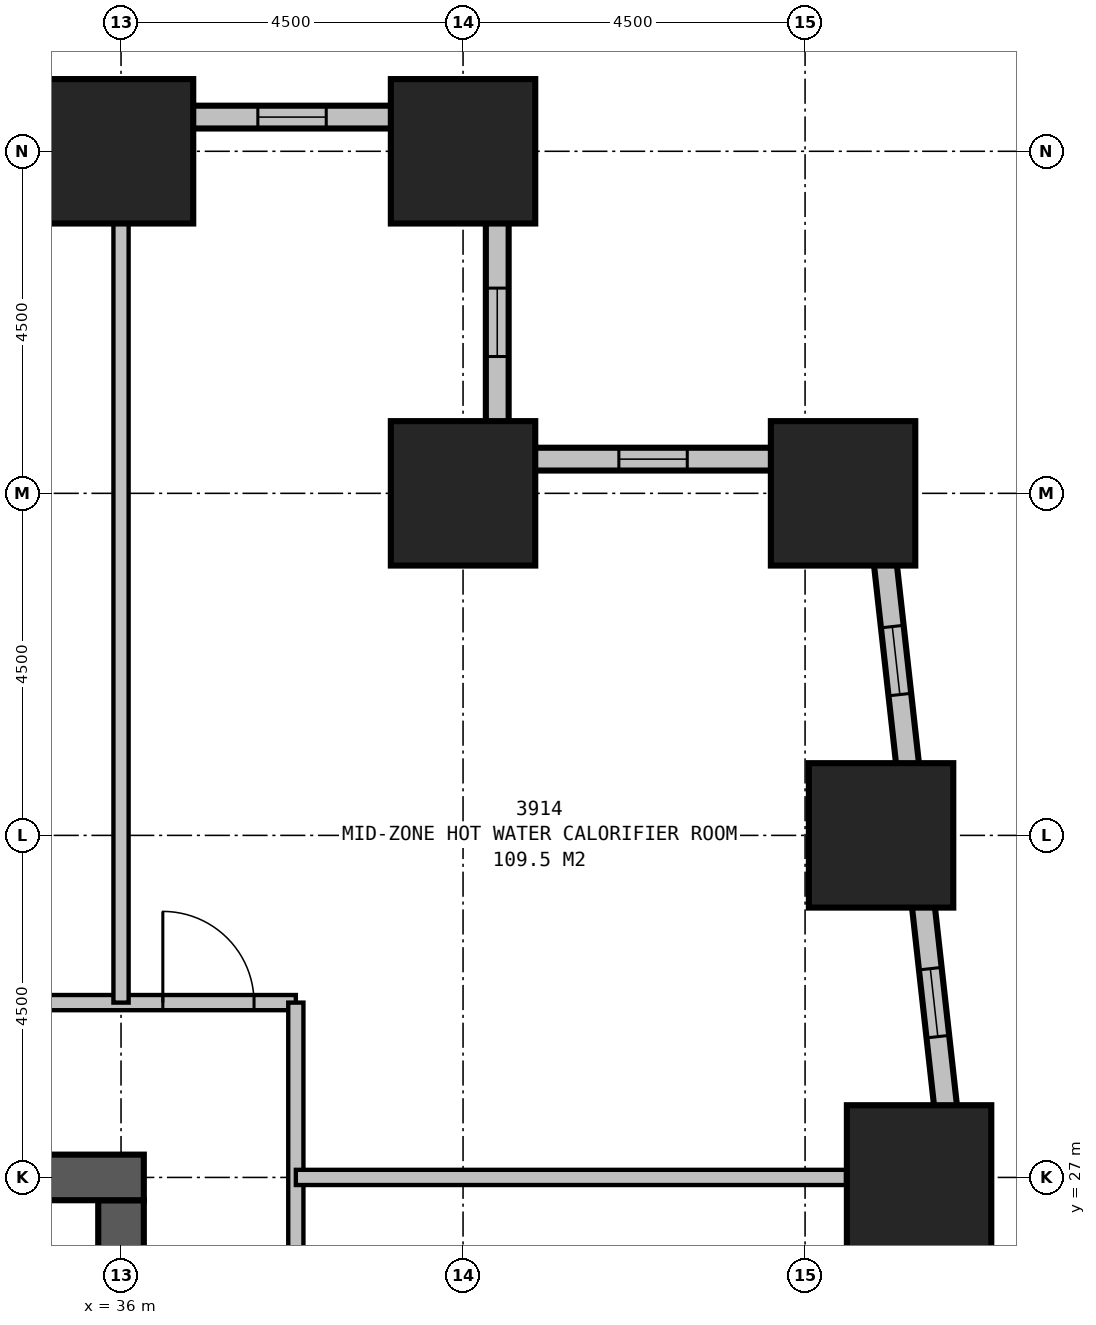
"""IFC4 building model, lengths in metres.
Left out: names, types, materials, properties, quantities, classifications, styles, units other than length and angle.
Written with IfcOpenShell. Run it as: python <this file> out.ifc"""

import sys

from ifc_helpers import new_model, si_unit, direction, frame, frame_2d, origin, origin_2d, place, context, subcontext, project, spatial, rectangle, extrude, element, fill, save


model = new_model("IFC4")
c1 = context("Model", 3, precision=1e-05, world=origin(), true_north=direction((0.0, 1.0)))
c2 = subcontext(c1, "Body", "Model", "MODEL_VIEW")
j1 = project(units=[si_unit("LENGTHUNIT", "METRE"), si_unit("PLANEANGLEUNIT", "RADIAN")], contexts=[c1])
p1 = place(None, origin())
s1 = spatial("IfcSite", under=j1, at=p1, CompositionType="ELEMENT")
p2 = place(p1, origin())
s2 = spatial("IfcBuilding", under=s1, at=p2, CompositionType="ELEMENT")
p3 = place(p2, frame((0.0, 0.0, 151.9)))
s3 = spatial("IfcBuildingStorey", under=s2, at=p3, CompositionType="ELEMENT", Elevation=151.9)
for number, where, z_axis, x_axis in (
    (1, (46.5, 27.0, 0.0), (0.0, 0.0, 1.0), (1.0, 0.0, 0.0)),
    (2, (46.0, 31.5, 0.0), (0.0, 0.0, 1.0), (1.0, 0.0, 0.0)),
    (3, (45.5, 36.0, 0.0), (0.0, 0.0, 1.0), (1.0, 0.0, 0.0)),
    (4, (40.5, 36.0, 0.0), (0.0, 0.0, 1.0), (1.0, 0.0, 0.0)),
    (5, (40.5, 40.5, 0.0), (0.0, 0.0, 1.0), (1.0, 0.0, 0.0)),
    (6, (36.0, 40.5, 0.0), (0.0, 0.0, 1.0), (1.0, 0.0, 0.0)),
):
    element("IfcColumn", number, at=place(p3, frame(where, z_axis=z_axis, x_axis=x_axis)), inside=s3, PredefinedType="COLUMN", context=c2, shape_type="SweptSolid", body=[
        extrude(rectangle(XDim=1.9, YDim=1.9, at=origin_2d()), origin(), (0.0, 0.0, 1.0), 6.0),
    ])
p4 = place(p3, frame((36.3, 27.0, 0.0), z_axis=(0.0, 0.0, 1.0), x_axis=(-1.0, 0.0, 0.0)))
e7 = element("IfcWall", 7, at=p4, inside=s3, PredefinedType="SHEAR", context=c2, shape_type="SweptSolid", body=[
    extrude(rectangle(XDim=23.1, YDim=0.6, at=frame_2d((11.55, 0.0))), origin(), (0.0, 0.0, 1.0), 6.0),
])
p5 = place(p4, frame((17.05, 0.0, 0.0)))
e8 = element("IfcOpeningElement", 8, at=p5, cuts=e7, PredefinedType="OPENING", context=c2, shape_type="SweptSolid", body=[
    extrude(rectangle(XDim=1.0, YDim=2.1, at=frame_2d((0.5, 1.05))), frame((0.0, 0.31, 0.0), z_axis=(0.0, -1.0, 0.0), x_axis=(1.0, 0.0, 0.0)), (0.0, 0.0, 1.0), 0.62),
])
p6 = place(p4, frame((12.05, 0.0, 0.0)))
e9 = element("IfcOpeningElement", 9, at=p6, cuts=e7, PredefinedType="OPENING", context=c2, shape_type="SweptSolid", body=[
    extrude(rectangle(XDim=1.0, YDim=2.1, at=frame_2d((0.5, 1.05))), frame((0.0, 0.31, 0.0), z_axis=(0.0, -1.0, 0.0), x_axis=(1.0, 0.0, 0.0)), (0.0, 0.0, 1.0), 0.62),
])
p7 = place(p4, frame((7.05, 0.0, 0.0)))
e10 = element("IfcOpeningElement", 10, at=p7, cuts=e7, PredefinedType="OPENING", context=c2, shape_type="SweptSolid", body=[
    extrude(rectangle(XDim=1.0, YDim=2.1, at=frame_2d((0.5, 1.05))), frame((0.0, 0.31, 0.0), z_axis=(0.0, -1.0, 0.0), x_axis=(1.0, 0.0, 0.0)), (0.0, 0.0, 1.0), 0.62),
])
p8 = place(p3, frame((36.0, 20.0, 0.0), z_axis=(0.0, 0.0, 1.0), x_axis=(0.0, 1.0, 0.0)))
e11 = element("IfcWall", 11, at=p8, inside=s3, PredefinedType="SHEAR", context=c2, shape_type="SweptSolid", body=[
    extrude(rectangle(XDim=6.7, YDim=0.6, at=frame_2d((3.35, 0.0))), origin(), (0.0, 0.0, 1.0), 6.0),
])
p9 = place(p3, frame((49.519, 3.901, 0.0), z_axis=(0.0, 0.0, 1.0), x_axis=(-0.110429082637, 0.993884006164, 0.0)))
e12 = element("IfcWall", 12, at=p9, inside=s3, PredefinedType="STANDARD", context=c2, shape_type="SweptSolid", body=[
    extrude(rectangle(XDim=32.899, YDim=0.3, at=frame_2d((16.45, 0.0))), origin(), (0.0, 0.0, 1.0), 3.35),
])
p10 = place(p9, frame((2.467, 0.0, 0.5)))
e13 = element("IfcOpeningElement", 13, at=p10, cuts=e12, PredefinedType="OPENING", context=c2, shape_type="SweptSolid", body=[
    extrude(rectangle(XDim=0.9, YDim=1.2, at=frame_2d((0.45, 0.6))), frame((0.0, 0.16, 0.0), z_axis=(0.0, -1.0, 0.0), x_axis=(1.0, 0.0, 0.0)), (0.0, 0.0, 1.0), 0.32),
])
p11 = place(p9, frame((6.995, 0.0, 0.5)))
e14 = element("IfcOpeningElement", 14, at=p11, cuts=e12, PredefinedType="OPENING", context=c2, shape_type="SweptSolid", body=[
    extrude(rectangle(XDim=0.9, YDim=1.2, at=frame_2d((0.45, 0.6))), frame((0.0, 0.16, 0.0), z_axis=(0.0, -1.0, 0.0), x_axis=(1.0, 0.0, 0.0)), (0.0, 0.0, 1.0), 0.32),
])
p12 = place(p9, frame((11.522, 0.0, 0.5)))
e15 = element("IfcOpeningElement", 15, at=p12, cuts=e12, PredefinedType="OPENING", context=c2, shape_type="SweptSolid", body=[
    extrude(rectangle(XDim=0.9, YDim=1.2, at=frame_2d((0.45, 0.6))), frame((0.0, 0.16, 0.0), z_axis=(0.0, -1.0, 0.0), x_axis=(1.0, 0.0, 0.0)), (0.0, 0.0, 1.0), 0.32),
])
p13 = place(p9, frame((16.05, 0.0, 0.5)))
e16 = element("IfcOpeningElement", 16, at=p13, cuts=e12, PredefinedType="OPENING", context=c2, shape_type="SweptSolid", body=[
    extrude(rectangle(XDim=0.9, YDim=1.2, at=frame_2d((0.45, 0.6))), frame((0.0, 0.16, 0.0), z_axis=(0.0, -1.0, 0.0), x_axis=(1.0, 0.0, 0.0)), (0.0, 0.0, 1.0), 0.32),
])
p14 = place(p9, frame((20.578, 0.0, 0.5)))
e17 = element("IfcOpeningElement", 17, at=p14, cuts=e12, PredefinedType="OPENING", context=c2, shape_type="SweptSolid", body=[
    extrude(rectangle(XDim=0.9, YDim=1.2, at=frame_2d((0.45, 0.6))), frame((0.0, 0.16, 0.0), z_axis=(0.0, -1.0, 0.0), x_axis=(1.0, 0.0, 0.0)), (0.0, 0.0, 1.0), 0.32),
])
p15 = place(p9, frame((25.105, 0.0, 0.5)))
e18 = element("IfcOpeningElement", 18, at=p15, cuts=e12, PredefinedType="OPENING", context=c2, shape_type="SweptSolid", body=[
    extrude(rectangle(XDim=0.9, YDim=1.2, at=frame_2d((0.45, 0.6))), frame((0.0, 0.16, 0.0), z_axis=(0.0, -1.0, 0.0), x_axis=(1.0, 0.0, 0.0)), (0.0, 0.0, 1.0), 0.32),
])
p16 = place(p9, frame((29.633, 0.0, 0.5)))
e19 = element("IfcOpeningElement", 19, at=p16, cuts=e12, PredefinedType="OPENING", context=c2, shape_type="SweptSolid", body=[
    extrude(rectangle(XDim=0.9, YDim=1.2, at=frame_2d((0.45, 0.6))), frame((0.0, 0.16, 0.0), z_axis=(0.0, -1.0, 0.0), x_axis=(1.0, 0.0, 0.0)), (0.0, 0.0, 1.0), 0.32),
])
p17 = place(p3, frame((46.053, 36.45, 0.0), z_axis=(0.0, 0.0, 1.0), x_axis=(-1.0, 0.0, 0.0)))
e20 = element("IfcWall", 20, at=p17, inside=s3, PredefinedType="STANDARD", context=c2, shape_type="SweptSolid", body=[
    extrude(rectangle(XDim=5.253, YDim=0.3, at=frame_2d((2.626, 0.0))), origin(), (0.0, 0.0, 1.0), 3.35),
])
p18 = place(p17, frame((2.603, 0.0, 0.5)))
e21 = element("IfcOpeningElement", 21, at=p18, cuts=e20, PredefinedType="OPENING", context=c2, shape_type="SweptSolid", body=[
    extrude(rectangle(XDim=0.9, YDim=1.2, at=frame_2d((0.45, 0.6))), frame((0.0, 0.16, 0.0), z_axis=(0.0, -1.0, 0.0), x_axis=(1.0, 0.0, 0.0)), (0.0, 0.0, 1.0), 0.32),
])
p19 = place(p3, frame((40.95, 36.3, 0.0), z_axis=(0.0, 0.0, 1.0), x_axis=(0.0, 1.0, 0.0)))
e22 = element("IfcWall", 22, at=p19, inside=s3, PredefinedType="STANDARD", context=c2, shape_type="SweptSolid", body=[
    extrude(rectangle(XDim=4.8, YDim=0.3, at=frame_2d((2.4, 0.0))), origin(), (0.0, 0.0, 1.0), 3.35),
])
p20 = place(p19, frame((1.5, 0.0, 0.5)))
e23 = element("IfcOpeningElement", 23, at=p20, cuts=e22, PredefinedType="OPENING", context=c2, shape_type="SweptSolid", body=[
    extrude(rectangle(XDim=0.9, YDim=1.2, at=frame_2d((0.45, 0.6))), frame((0.0, 0.16, 0.0), z_axis=(0.0, -1.0, 0.0), x_axis=(1.0, 0.0, 0.0)), (0.0, 0.0, 1.0), 0.32),
])
p21 = place(p3, frame((41.1, 40.95, 0.0), z_axis=(0.0, 0.0, 1.0), x_axis=(-1.0, 0.0, 0.0)))
e24 = element("IfcWall", 24, at=p21, inside=s3, PredefinedType="STANDARD", context=c2, shape_type="SweptSolid", body=[
    extrude(rectangle(XDim=32.7, YDim=0.3, at=frame_2d((16.35, 0.0))), origin(), (0.0, 0.0, 1.0), 3.35),
])
p22 = place(p21, frame((2.4, 0.0, 0.5)))
e25 = element("IfcOpeningElement", 25, at=p22, cuts=e24, PredefinedType="OPENING", context=c2, shape_type="SweptSolid", body=[
    extrude(rectangle(XDim=0.9, YDim=1.2, at=frame_2d((0.45, 0.6))), frame((0.0, 0.16, 0.0), z_axis=(0.0, -1.0, 0.0), x_axis=(1.0, 0.0, 0.0)), (0.0, 0.0, 1.0), 0.32),
])
p23 = place(p21, frame((6.9, 0.0, 0.5)))
e26 = element("IfcOpeningElement", 26, at=p23, cuts=e24, PredefinedType="OPENING", context=c2, shape_type="SweptSolid", body=[
    extrude(rectangle(XDim=0.9, YDim=1.2, at=frame_2d((0.45, 0.6))), frame((0.0, 0.16, 0.0), z_axis=(0.0, -1.0, 0.0), x_axis=(1.0, 0.0, 0.0)), (0.0, 0.0, 1.0), 0.32),
])
p24 = place(p21, frame((11.4, 0.0, 0.5)))
e27 = element("IfcOpeningElement", 27, at=p24, cuts=e24, PredefinedType="OPENING", context=c2, shape_type="SweptSolid", body=[
    extrude(rectangle(XDim=0.9, YDim=1.2, at=frame_2d((0.45, 0.6))), frame((0.0, 0.16, 0.0), z_axis=(0.0, -1.0, 0.0), x_axis=(1.0, 0.0, 0.0)), (0.0, 0.0, 1.0), 0.32),
])
p25 = place(p21, frame((15.9, 0.0, 0.5)))
e28 = element("IfcOpeningElement", 28, at=p25, cuts=e24, PredefinedType="OPENING", context=c2, shape_type="SweptSolid", body=[
    extrude(rectangle(XDim=0.9, YDim=1.2, at=frame_2d((0.45, 0.6))), frame((0.0, 0.16, 0.0), z_axis=(0.0, -1.0, 0.0), x_axis=(1.0, 0.0, 0.0)), (0.0, 0.0, 1.0), 0.32),
])
p26 = place(p21, frame((20.4, 0.0, 0.5)))
e29 = element("IfcOpeningElement", 29, at=p26, cuts=e24, PredefinedType="OPENING", context=c2, shape_type="SweptSolid", body=[
    extrude(rectangle(XDim=0.9, YDim=1.2, at=frame_2d((0.45, 0.6))), frame((0.0, 0.16, 0.0), z_axis=(0.0, -1.0, 0.0), x_axis=(1.0, 0.0, 0.0)), (0.0, 0.0, 1.0), 0.32),
])
p27 = place(p21, frame((24.9, 0.0, 0.5)))
e30 = element("IfcOpeningElement", 30, at=p27, cuts=e24, PredefinedType="OPENING", context=c2, shape_type="SweptSolid", body=[
    extrude(rectangle(XDim=0.9, YDim=1.2, at=frame_2d((0.45, 0.6))), frame((0.0, 0.16, 0.0), z_axis=(0.0, -1.0, 0.0), x_axis=(1.0, 0.0, 0.0)), (0.0, 0.0, 1.0), 0.32),
])
p28 = place(p21, frame((29.4, 0.0, 0.5)))
e31 = element("IfcOpeningElement", 31, at=p28, cuts=e24, PredefinedType="OPENING", context=c2, shape_type="SweptSolid", body=[
    extrude(rectangle(XDim=0.9, YDim=1.2, at=frame_2d((0.45, 0.6))), frame((0.0, 0.16, 0.0), z_axis=(0.0, -1.0, 0.0), x_axis=(1.0, 0.0, 0.0)), (0.0, 0.0, 1.0), 0.32),
])
p29 = place(p3, frame((38.3, 11.2, 0.0), z_axis=(0.0, 0.0, 1.0), x_axis=(0.0, 1.0, 0.0)))
e32 = element("IfcWall", 32, at=p29, inside=s3, PredefinedType="PARTITIONING", context=c2, shape_type="SweptSolid", body=[
    extrude(rectangle(XDim=18.1, YDim=0.2, at=frame_2d((9.05, 0.0))), origin(), (0.0, 0.0, 1.0), 5.75),
])
p30 = place(p29, frame((3.95, 0.0, 0.0), z_axis=(0.0, 0.0, 1.0), x_axis=(-1.0, 0.0, 0.0)))
e33 = element("IfcOpeningElement", 33, at=p30, cuts=e32, PredefinedType="OPENING", context=c2, shape_type="SweptSolid", body=[
    extrude(rectangle(XDim=1.2, YDim=2.1, at=frame_2d((0.6, 1.05))), frame((0.0, 0.11, 0.0), z_axis=(0.0, -1.0, 0.0), x_axis=(1.0, 0.0, 0.0)), (0.0, 0.0, 1.0), 0.22),
])
p31 = place(p3, frame((11.2, 29.3, 0.0), z_axis=(0.0, 0.0, 1.0), x_axis=(1.0, 0.0, 0.0)))
e34 = element("IfcWall", 34, at=p31, inside=s3, PredefinedType="PARTITIONING", context=c2, shape_type="SweptSolid", body=[
    extrude(rectangle(XDim=27.1, YDim=0.2, at=frame_2d((13.55, 0.0))), origin(), (0.0, 0.0, 1.0), 5.75),
])
p32 = place(p31, frame((2.75, 0.0, 0.0)))
e35 = element("IfcOpeningElement", 35, at=p32, cuts=e34, PredefinedType="OPENING", context=c2, shape_type="SweptSolid", body=[
    extrude(rectangle(XDim=1.2, YDim=2.1, at=frame_2d((0.6, 1.05))), frame((0.0, 0.11, 0.0), z_axis=(0.0, -1.0, 0.0), x_axis=(1.0, 0.0, 0.0)), (0.0, 0.0, 1.0), 0.22),
])
p33 = place(p31, frame((11.75, 0.0, 0.0)))
e36 = element("IfcOpeningElement", 36, at=p33, cuts=e34, PredefinedType="OPENING", context=c2, shape_type="SweptSolid", body=[
    extrude(rectangle(XDim=1.0, YDim=2.1, at=frame_2d((0.5, 1.05))), frame((0.0, 0.11, 0.0), z_axis=(0.0, -1.0, 0.0), x_axis=(1.0, 0.0, 0.0)), (0.0, 0.0, 1.0), 0.22),
])
p34 = place(p31, frame((16.25, 0.0, 0.0)))
e37 = element("IfcOpeningElement", 37, at=p34, cuts=e34, PredefinedType="OPENING", context=c2, shape_type="SweptSolid", body=[
    extrude(rectangle(XDim=1.2, YDim=2.1, at=frame_2d((0.6, 1.05))), frame((0.0, 0.11, 0.0), z_axis=(0.0, -1.0, 0.0), x_axis=(1.0, 0.0, 0.0)), (0.0, 0.0, 1.0), 0.22),
])
p35 = place(p31, frame((0.55, 0.0, 0.0)))
e38 = element("IfcOpeningElement", 38, at=p35, cuts=e34, PredefinedType="OPENING", context=c2, shape_type="SweptSolid", body=[
    extrude(rectangle(XDim=1.2, YDim=2.1, at=frame_2d((0.6, 1.05))), frame((0.0, 0.11, 0.0), z_axis=(0.0, -1.0, 0.0), x_axis=(1.0, 0.0, 0.0)), (0.0, 0.0, 1.0), 0.22),
])
p36 = place(p31, frame((25.35, 0.0, 0.0)))
e39 = element("IfcOpeningElement", 39, at=p36, cuts=e34, PredefinedType="OPENING", context=c2, shape_type="SweptSolid", body=[
    extrude(rectangle(XDim=1.2, YDim=2.1, at=frame_2d((0.6, 1.05))), frame((0.0, 0.11, 0.0), z_axis=(0.0, -1.0, 0.0), x_axis=(1.0, 0.0, 0.0)), (0.0, 0.0, 1.0), 0.22),
])
p37 = place(p3, frame((38.3, 27.0, 0.0), z_axis=(0.0, 0.0, 1.0), x_axis=(1.0, 0.0, 0.0)))
e40 = element("IfcWall", 40, at=p37, inside=s3, PredefinedType="PARTITIONING", context=c2, shape_type="SweptSolid", body=[
    extrude(rectangle(XDim=7.239, YDim=0.2, at=frame_2d((3.62, 0.0))), origin(), (0.0, 0.0, 1.0), 4.45),
])
p38 = place(p3, frame((36.0, 29.3, 0.0), z_axis=(0.0, 0.0, 1.0), x_axis=(0.0, 1.0, 0.0)))
e41 = element("IfcWall", 41, at=p38, inside=s3, PredefinedType="PARTITIONING", context=c2, shape_type="SweptSolid", body=[
    extrude(rectangle(XDim=10.25, YDim=0.2, at=frame_2d((5.125, 0.0))), origin(), (0.0, 0.0, 1.0), 4.75),
])
p39 = place(p15, origin())
e42 = element("IfcWindow", 42, at=p39, inside=s3, PartitioningType="SINGLE_PANEL", PredefinedType="USERDEFINED", context=c2, shape_type="SweptSolid", body=[
    extrude(rectangle(XDim=0.9, YDim=1.2, at=frame_2d((0.45, 0.6))), frame((0.0, 0.03, 0.0), z_axis=(0.0, -1.0, 0.0), x_axis=(1.0, 0.0, 0.0)), (0.0, 0.0, 1.0), 0.06),
])
fill(e18, e42)
p40 = place(p16, origin())
e43 = element("IfcWindow", 43, at=p40, inside=s3, PartitioningType="SINGLE_PANEL", PredefinedType="USERDEFINED", context=c2, shape_type="SweptSolid", body=[
    extrude(rectangle(XDim=0.9, YDim=1.2, at=frame_2d((0.45, 0.6))), frame((0.0, 0.03, 0.0), z_axis=(0.0, -1.0, 0.0), x_axis=(1.0, 0.0, 0.0)), (0.0, 0.0, 1.0), 0.06),
])
fill(e19, e43)
p41 = place(p18, origin())
e44 = element("IfcWindow", 44, at=p41, inside=s3, PartitioningType="SINGLE_PANEL", PredefinedType="USERDEFINED", context=c2, shape_type="SweptSolid", body=[
    extrude(rectangle(XDim=0.9, YDim=1.2, at=frame_2d((0.45, 0.6))), frame((0.0, 0.03, 0.0), z_axis=(0.0, -1.0, 0.0), x_axis=(1.0, 0.0, 0.0)), (0.0, 0.0, 1.0), 0.06),
])
fill(e21, e44)
p42 = place(p20, origin())
e45 = element("IfcWindow", 45, at=p42, inside=s3, PartitioningType="SINGLE_PANEL", PredefinedType="USERDEFINED", context=c2, shape_type="SweptSolid", body=[
    extrude(rectangle(XDim=0.9, YDim=1.2, at=frame_2d((0.45, 0.6))), frame((0.0, 0.03, 0.0), z_axis=(0.0, -1.0, 0.0), x_axis=(1.0, 0.0, 0.0)), (0.0, 0.0, 1.0), 0.06),
])
fill(e23, e45)
p43 = place(p22, origin())
e46 = element("IfcWindow", 46, at=p43, inside=s3, PartitioningType="SINGLE_PANEL", PredefinedType="USERDEFINED", context=c2, shape_type="SweptSolid", body=[
    extrude(rectangle(XDim=0.9, YDim=1.2, at=frame_2d((0.45, 0.6))), frame((0.0, 0.03, 0.0), z_axis=(0.0, -1.0, 0.0), x_axis=(1.0, 0.0, 0.0)), (0.0, 0.0, 1.0), 0.06),
])
fill(e25, e46)
p44 = place(p36, origin())
e47 = element("IfcDoor", 47, at=p44, inside=s3, OperationType="SINGLE_SWING_LEFT", PredefinedType="DOOR", context=c2, shape_type="SweptSolid", body=[
    extrude(rectangle(XDim=1.2, YDim=2.1, at=frame_2d((0.6, 1.05))), frame((0.0, 0.025, 0.0), z_axis=(0.0, -1.0, 0.0), x_axis=(1.0, 0.0, 0.0)), (0.0, 0.0, 1.0), 0.05),
])
fill(e39, e47)
save(model, sys.argv[1])
